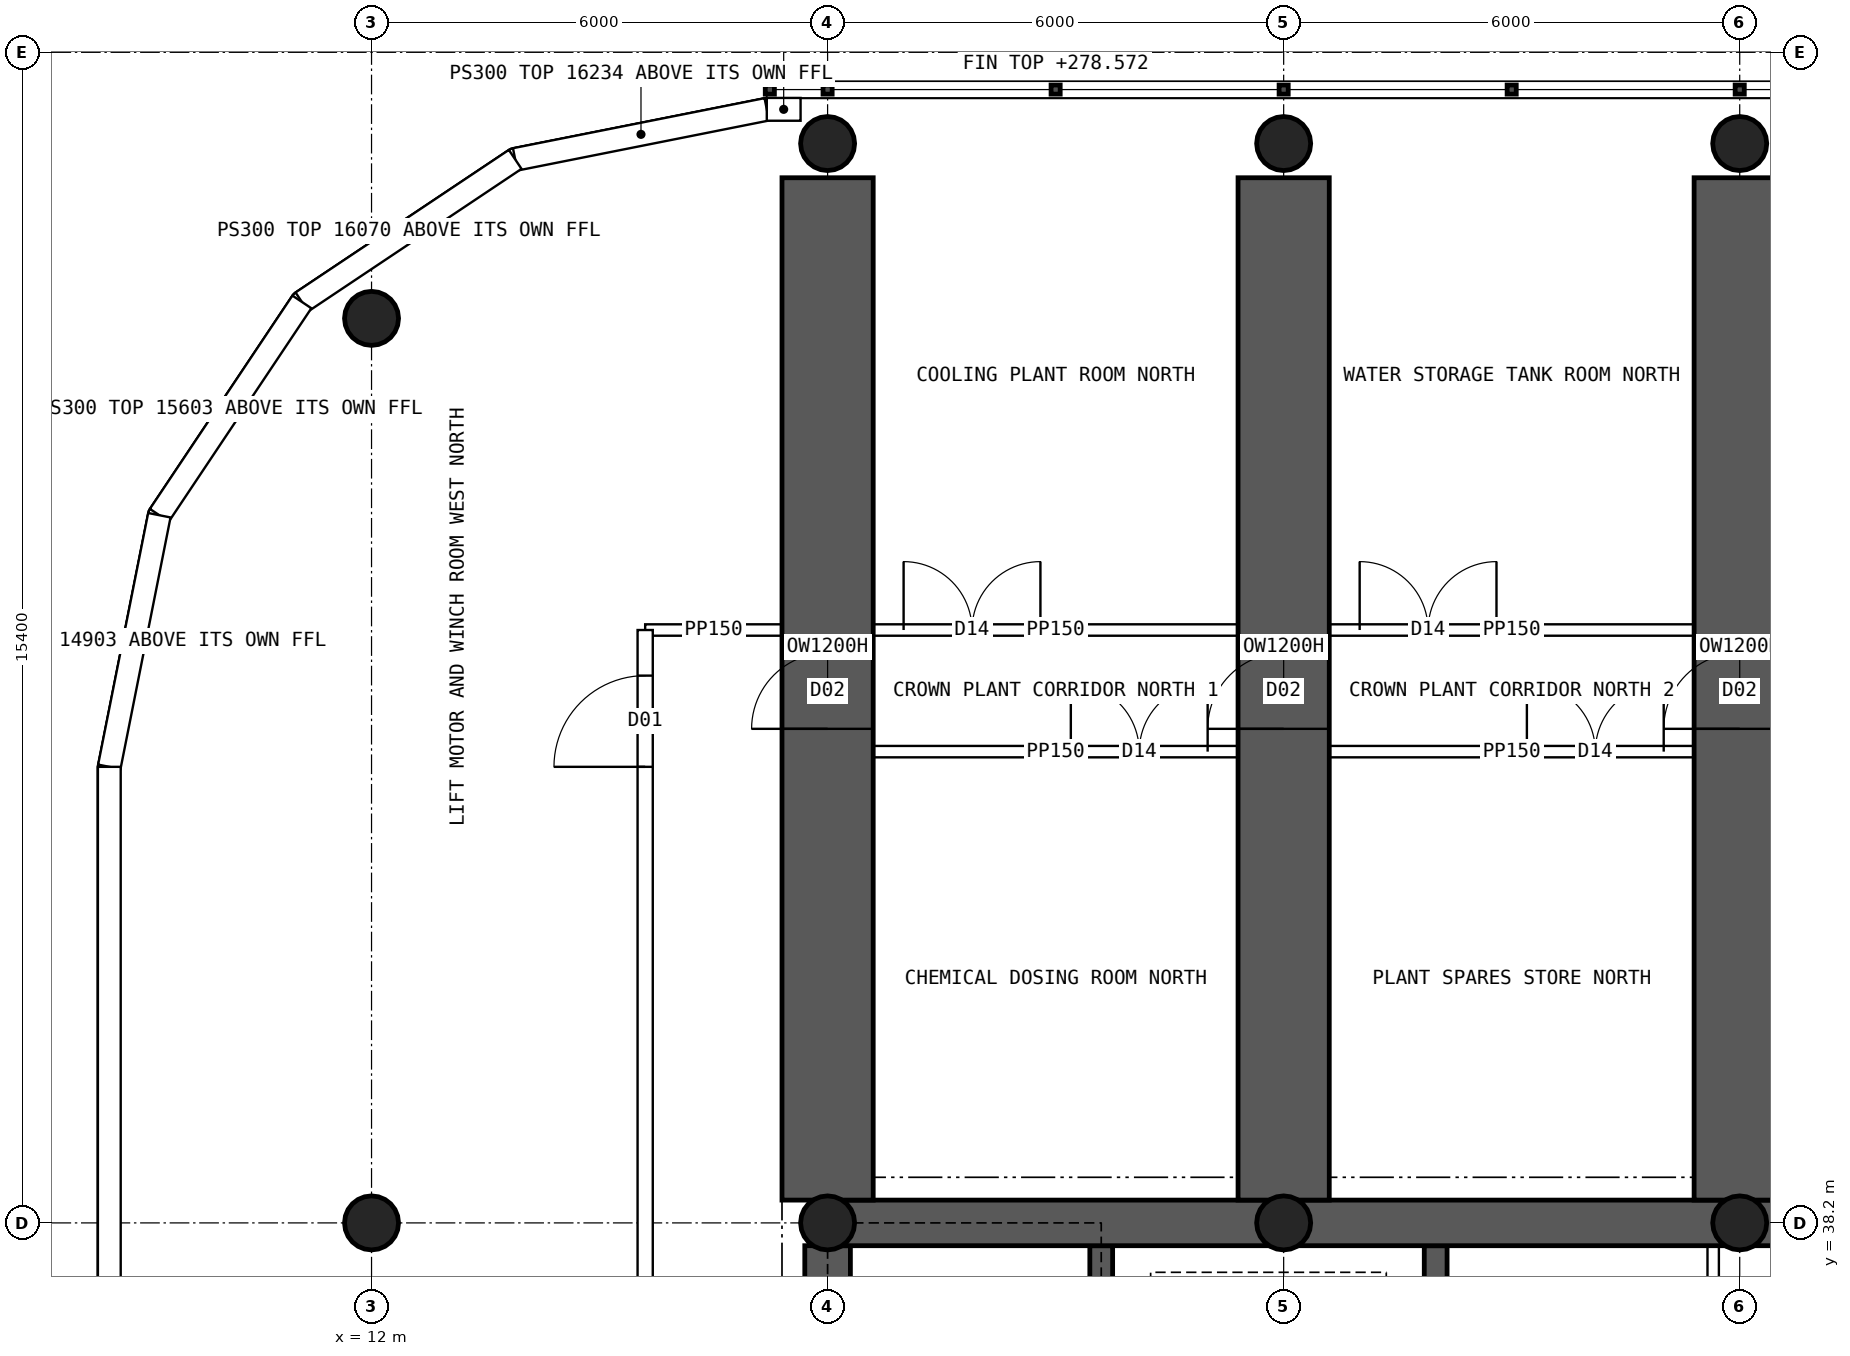
"""IFC4 building model, lengths in metres.
Left out: names, types, materials, properties, quantities, classifications, styles, units other than length and angle.
Written with IfcOpenShell. Run it as: python <this file> out.ifc"""

import sys

from ifc_helpers import new_model, si_unit, direction, frame, frame_2d, origin, origin_2d, place, context, subcontext, project, spatial, polyline, rectangle, hollow_circle, outline, extrude, clip, halfspace, element, fill, save


model = new_model("IFC4")
c1 = context("Model", 3, precision=1e-05, world=origin(), true_north=direction((0.0, 1.0)))
c2 = subcontext(c1, "Body", "Model", "MODEL_VIEW")
j1 = project(units=[si_unit("LENGTHUNIT", "METRE"), si_unit("PLANEANGLEUNIT", "RADIAN")], contexts=[c1])
p1 = place(None, origin())
s1 = spatial("IfcSite", under=j1, at=p1, CompositionType="ELEMENT")
p2 = place(p1, origin())
s2 = spatial("IfcBuilding", under=s1, at=p2, CompositionType="ELEMENT")
p3 = place(p2, frame((0.0, 0.0, 262.3)))
s3 = spatial("IfcBuildingStorey", under=s2, at=p3, CompositionType="ELEMENT", Elevation=262.3)
p4 = place(p3, frame((18.0, 38.2, 0.0), z_axis=(0.0, 0.0, 1.0), x_axis=(1.0, 0.0, 0.0)))
e1 = element("IfcWall", 1, at=p4, inside=s3, PredefinedType="SHEAR", context=c2, shape_type="SweptSolid", body=[
    extrude(rectangle(XDim=48.0, YDim=0.6, at=frame_2d((24.0, 0.0))), origin(), (0.0, 0.0, 1.0), 6.0),
])
p5 = place(p3, frame((18.0, 26.1, 0.0), z_axis=(0.0, 0.0, 1.0), x_axis=(0.0, 1.0, 0.0)))
e2 = element("IfcWall", 2, at=p5, inside=s3, PredefinedType="SHEAR", context=c2, shape_type="SweptSolid", body=[
    extrude(rectangle(XDim=11.8, YDim=0.6, at=frame_2d((5.9, 0.0))), origin(), (0.0, 0.0, 1.0), 6.0),
])
p6 = place(p5, frame((5.2, 0.0, 0.0)))
e3 = element("IfcOpeningElement", 3, at=p6, cuts=e2, PredefinedType="OPENING", context=c2, shape_type="SweptSolid", body=[
    extrude(rectangle(XDim=1.2, YDim=2.1, at=frame_2d((0.6, 1.05))), frame((0.0, 0.31, 0.0), z_axis=(0.0, -1.0, 0.0), x_axis=(1.0, 0.0, 0.0)), (0.0, 0.0, 1.0), 0.62),
])
for number, where, z_axis, x_axis in (
    (4, (21.6, 34.75, 0.0), (0.0, 0.0, 1.0), (0.0, 1.0, 0.0)),
    (5, (26.0, 34.75, 0.0), (0.0, 0.0, 1.0), (0.0, 1.0, 0.0)),
):
    element("IfcWall", number, at=place(p3, frame(where, z_axis=z_axis, x_axis=x_axis)), inside=s3, PredefinedType="SHEAR", context=c2, shape_type="SweptSolid", body=[
        extrude(rectangle(XDim=3.15, YDim=0.3, at=frame_2d((1.575, 0.0))), origin(), (0.0, 0.0, 1.0), 6.0),
    ])
p7 = place(p3, frame((18.0, 38.5, 0.0), z_axis=(0.0, 0.0, 1.0), x_axis=(0.0, 1.0, 0.0)))
e6 = element("IfcWall", 6, at=p7, inside=s3, PredefinedType="SHEAR", context=c2, shape_type="SweptSolid", body=[
    extrude(rectangle(XDim=13.45, YDim=1.2, at=frame_2d((6.725, 0.0))), origin(), (0.0, 0.0, 1.0), 4.4),
])
p8 = place(p7, frame((6.2, 0.0, 0.0)))
e7 = element("IfcOpeningElement", 7, at=p8, cuts=e6, PredefinedType="OPENING", context=c2, shape_type="SweptSolid", body=[
    extrude(rectangle(XDim=1.0, YDim=2.1, at=frame_2d((0.5, 1.05))), frame((0.0, 0.61, 0.0), z_axis=(0.0, -1.0, 0.0), x_axis=(1.0, 0.0, 0.0)), (0.0, 0.0, 1.0), 1.22),
])
p9 = place(p3, frame((24.0, 38.5, 0.0), z_axis=(0.0, 0.0, 1.0), x_axis=(0.0, 1.0, 0.0)))
e8 = element("IfcWall", 8, at=p9, inside=s3, PredefinedType="SHEAR", context=c2, shape_type="SweptSolid", body=[
    extrude(rectangle(XDim=13.45, YDim=1.2, at=frame_2d((6.725, 0.0))), origin(), (0.0, 0.0, 1.0), 4.4),
])
p10 = place(p9, frame((6.2, 0.0, 0.0)))
e9 = element("IfcOpeningElement", 9, at=p10, cuts=e8, PredefinedType="OPENING", context=c2, shape_type="SweptSolid", body=[
    extrude(rectangle(XDim=1.0, YDim=2.1, at=frame_2d((0.5, 1.05))), frame((0.0, 0.61, 0.0), z_axis=(0.0, -1.0, 0.0), x_axis=(1.0, 0.0, 0.0)), (0.0, 0.0, 1.0), 1.22),
])
p11 = place(p3, frame((30.0, 38.5, 0.0), z_axis=(0.0, 0.0, 1.0), x_axis=(0.0, 1.0, 0.0)))
e10 = element("IfcWall", 10, at=p11, inside=s3, PredefinedType="SHEAR", context=c2, shape_type="SweptSolid", body=[
    extrude(rectangle(XDim=13.45, YDim=1.2, at=frame_2d((6.725, 0.0))), origin(), (0.0, 0.0, 1.0), 4.4),
])
p12 = place(p11, frame((6.2, 0.0, 0.0)))
e11 = element("IfcOpeningElement", 11, at=p12, cuts=e10, PredefinedType="OPENING", context=c2, shape_type="SweptSolid", body=[
    extrude(rectangle(XDim=1.0, YDim=2.1, at=frame_2d((0.5, 1.05))), frame((0.0, 0.61, 0.0), z_axis=(0.0, -1.0, 0.0), x_axis=(1.0, 0.0, 0.0)), (0.0, 0.0, 1.0), 1.22),
])
p13 = place(p3, frame((12.0, 38.2, 0.0), z_axis=(0.0, 0.0, 1.0), x_axis=(1.0, 0.0, 0.0)))
e12 = element("IfcColumn", 12, at=p13, inside=s3, PredefinedType="COLUMN", context=c2, shape_type="SweptSolid", body=[
    extrude(hollow_circle(Radius=0.355, WallThickness=0.025, at=origin_2d()), origin(), (0.0, 0.0, 1.0), 11.524),
])
p14 = place(p3, frame((12.0, 50.1, 0.0), z_axis=(0.0, 0.0, 1.0), x_axis=(1.0, 0.0, 0.0)))
e13 = element("IfcColumn", 13, at=p14, inside=s3, PredefinedType="COLUMN", context=c2, shape_type="SweptSolid", body=[
    extrude(hollow_circle(Radius=0.355, WallThickness=0.025, at=origin_2d()), origin(), (0.0, 0.0, 1.0), 14.491),
])
p15 = place(p3, frame((18.0, 38.2, 0.0), z_axis=(0.0, 0.0, 1.0), x_axis=(1.0, 0.0, 0.0)))
e14 = element("IfcColumn", 14, at=p15, inside=s3, PredefinedType="COLUMN", context=c2, shape_type="SweptSolid", body=[
    extrude(hollow_circle(Radius=0.355, WallThickness=0.025, at=origin_2d()), origin(), (0.0, 0.0, 1.0), 11.517),
])
p16 = place(p3, frame((18.0, 52.4, 0.0), z_axis=(0.0, 0.0, 1.0), x_axis=(1.0, 0.0, 0.0)))
e15 = element("IfcColumn", 15, at=p16, inside=s3, PredefinedType="COLUMN", context=c2, shape_type="SweptSolid", body=[
    extrude(hollow_circle(Radius=0.355, WallThickness=0.025, at=origin_2d()), origin(), (0.0, 0.0, 1.0), 15.058),
])
p17 = place(p3, frame((24.0, 38.2, 0.0), z_axis=(0.0, 0.0, 1.0), x_axis=(1.0, 0.0, 0.0)))
e16 = element("IfcColumn", 16, at=p17, inside=s3, PredefinedType="COLUMN", context=c2, shape_type="SweptSolid", body=[
    extrude(hollow_circle(Radius=0.355, WallThickness=0.025, at=origin_2d()), origin(), (0.0, 0.0, 1.0), 11.517),
])
p18 = place(p3, frame((24.0, 52.4, 0.0), z_axis=(0.0, 0.0, 1.0), x_axis=(1.0, 0.0, 0.0)))
e17 = element("IfcColumn", 17, at=p18, inside=s3, PredefinedType="COLUMN", context=c2, shape_type="SweptSolid", body=[
    extrude(hollow_circle(Radius=0.355, WallThickness=0.025, at=origin_2d()), origin(), (0.0, 0.0, 1.0), 15.058),
])
p19 = place(p3, frame((30.0, 38.2, 0.0), z_axis=(0.0, 0.0, 1.0), x_axis=(1.0, 0.0, 0.0)))
e18 = element("IfcColumn", 18, at=p19, inside=s3, PredefinedType="COLUMN", context=c2, shape_type="SweptSolid", body=[
    extrude(hollow_circle(Radius=0.355, WallThickness=0.025, at=origin_2d()), origin(), (0.0, 0.0, 1.0), 11.517),
])
p20 = place(p3, frame((30.0, 52.4, 0.0), z_axis=(0.0, 0.0, 1.0), x_axis=(1.0, 0.0, 0.0)))
e19 = element("IfcColumn", 19, at=p20, inside=s3, PredefinedType="COLUMN", context=c2, shape_type="SweptSolid", body=[
    extrude(hollow_circle(Radius=0.355, WallThickness=0.025, at=origin_2d()), origin(), (0.0, 0.0, 1.0), 15.058),
])
p21 = place(p3, frame((8.55, 44.2, 0.0), z_axis=(0.0, 0.0, 1.0), x_axis=(0.0, -1.0, 0.0)))
e20 = element("IfcWall", 20, at=p21, inside=s3, PredefinedType="SOLIDWALL", context=c2, shape_type="Clipping", body=[
    clip(clip(extrude(outline(polyline([(-0.025, 0.0), (24.425, 0.0), (24.425, 7.988), (-0.025, 14.084), (-0.025, 0.0)])), frame((0.0, 0.15, 0.0), z_axis=(0.0, -1.0, 0.0), x_axis=(1.0, 0.0, 0.0)), (0.0, 0.0, 1.0), 0.3), halfspace(frame((0.0, 0.0, 0.0), z_axis=(-0.995184726707, 0.098017139978, 0.0)), False)), halfspace(frame((24.4, 0.0, 0.0), z_axis=(0.995184726707, 0.098017139978, 0.0)), False)),
])
p22 = place(p3, frame((17.2, 52.85, 0.0), z_axis=(0.0, 0.0, 1.0), x_axis=(-0.98078325777, -0.195100490205, 0.0)))
e21 = element("IfcWall", 21, at=p22, inside=s3, PredefinedType="SOLIDWALL", context=c2, shape_type="Clipping", body=[
    clip(clip(extrude(outline(polyline([(-0.04, 0.0), (3.415, 0.0), (3.415, 16.068), (-0.04, 16.236), (-0.04, 0.0)])), frame((0.0, 0.15, 0.0), z_axis=(0.0, -1.0, 0.0), x_axis=(1.0, 0.0, 0.0)), (0.0, 0.0, 1.0), 0.3), halfspace(frame((0.0, 0.0, 0.0), z_axis=(-0.980785349348, 0.195089975409, 0.0)), False)), halfspace(frame((3.375, 0.0, 0.0), z_axis=(0.980785349348, 0.195089975409, 0.0)), False)),
])
p23 = place(p3, frame((13.89, 52.192, 0.0), z_axis=(0.0, 0.0, 1.0), x_axis=(-0.831460037396, -0.555584562613, 0.0)))
e22 = element("IfcWall", 22, at=p23, inside=s3, PredefinedType="SOLIDWALL", context=c2, shape_type="Clipping", body=[
    clip(clip(extrude(outline(polyline([(-0.04, 0.0), (3.415, 0.0), (3.415, 15.597), (3.375, 15.603), (-0.04, 16.076), (-0.04, 0.0)])), frame((0.0, 0.15, 0.0), z_axis=(0.0, -1.0, 0.0), x_axis=(1.0, 0.0, 0.0)), (0.0, 0.0, 1.0), 0.3), halfspace(frame((0.0, 0.0, 0.0), z_axis=(-0.980785349348, 0.195089975409, 0.0)), False)), halfspace(frame((3.375, 0.0, 0.0), z_axis=(0.980785349348, 0.195089975409, 0.0)), False)),
])
p24 = place(p3, frame((11.083, 50.316, 0.0), z_axis=(0.0, 0.0, 1.0), x_axis=(-0.555567969291, -0.831471124873, 0.0)))
e23 = element("IfcWall", 23, at=p24, inside=s3, PredefinedType="SOLIDWALL", context=c2, shape_type="Clipping", body=[
    clip(clip(extrude(outline(polyline([(-0.04, 0.0), (3.415, 0.0), (3.415, 14.895), (-0.04, 15.611), (-0.04, 0.0)])), frame((0.0, 0.15, 0.0), z_axis=(0.0, -1.0, 0.0), x_axis=(1.0, 0.0, 0.0)), (0.0, 0.0, 1.0), 0.3), halfspace(frame((0.0, 0.0, 0.0), z_axis=(-0.980785349348, 0.195089975409, 0.0)), False)), halfspace(frame((3.375, 0.0, 0.0), z_axis=(0.980785349348, 0.195089975409, 0.0)), False)),
])
p25 = place(p3, frame((9.208, 47.51, 0.0), z_axis=(0.0, 0.0, 1.0), x_axis=(-0.19508664885, -0.980786011034, 0.0)))
e24 = element("IfcWall", 24, at=p25, inside=s3, PredefinedType="SOLIDWALL", context=c2, shape_type="Clipping", body=[
    clip(clip(extrude(outline(polyline([(-0.04, 0.0), (3.415, 0.0), (3.415, 14.068), (3.375, 14.078), (-0.04, 14.913), (-0.04, 0.0)])), frame((0.0, 0.15, 0.0), z_axis=(0.0, -1.0, 0.0), x_axis=(1.0, 0.0, 0.0)), (0.0, 0.0, 1.0), 0.3), halfspace(frame((0.0, 0.0, 0.0), z_axis=(-0.980785349348, 0.195089975409, 0.0)), False)), halfspace(frame((3.375, 0.0, 0.0), z_axis=(0.995184765828, 0.098016742771, 0.0)), False)),
])
p26 = place(p3, frame((17.2, 52.85, 0.0), z_axis=(0.0, 0.0, 1.0), x_axis=(1.0, 0.0, 0.0)))
e25 = element("IfcWall", 25, at=p26, inside=s3, PredefinedType="SOLIDWALL", context=c2, shape_type="SweptSolid", body=[
    extrude(outline(polyline([(0.0, 0.0), (0.445, 0.0), (0.445, 16.234), (0.0, 16.234), (0.0, 0.0)])), frame((0.0, 0.15, 0.0), z_axis=(0.0, -1.0, 0.0), x_axis=(1.0, 0.0, 0.0)), (0.0, 0.0, 1.0), 0.3),
])
p27 = place(p3, frame((29.651, 34.75, 0.0), z_axis=(0.0, 0.0, 1.0), x_axis=(0.0, 1.0, 0.0)))
e26 = element("IfcWall", 26, at=p27, inside=s3, PredefinedType="SOLIDWALL", context=c2, shape_type="SweptSolid", body=[
    extrude(rectangle(XDim=3.15, YDim=0.15, at=frame_2d((1.575, 0.0))), origin(), (0.0, 0.0, 1.0), 6.0),
])
p28 = place(p3, frame((15.6, 18.0, 0.0), z_axis=(0.0, 0.0, 1.0), x_axis=(0.0, 1.0, 0.0)))
e27 = element("IfcWall", 27, at=p28, inside=s3, PredefinedType="SOLIDWALL", context=c2, shape_type="SweptSolid", body=[
    extrude(rectangle(XDim=28.0, YDim=0.2, at=frame_2d((14.0, 0.0))), origin(), (0.0, 0.0, 1.0), 6.0),
])
p29 = place(p28, frame((13.1, 0.0, 0.0)))
e28 = element("IfcOpeningElement", 28, at=p29, cuts=e27, PredefinedType="OPENING", context=c2, shape_type="SweptSolid", body=[
    extrude(rectangle(XDim=1.8, YDim=2.1, at=frame_2d((0.9, 1.05))), frame((0.0, 0.11, 0.0), z_axis=(0.0, -1.0, 0.0), x_axis=(1.0, 0.0, 0.0)), (0.0, 0.0, 1.0), 0.22),
])
p30 = place(p28, frame((0.6, 0.0, 0.0)))
e29 = element("IfcOpeningElement", 29, at=p30, cuts=e27, PredefinedType="OPENING", context=c2, shape_type="SweptSolid", body=[
    extrude(rectangle(XDim=1.2, YDim=2.1, at=frame_2d((0.6, 1.05))), frame((0.0, 0.11, 0.0), z_axis=(0.0, -1.0, 0.0), x_axis=(1.0, 0.0, 0.0)), (0.0, 0.0, 1.0), 0.22),
])
p31 = place(p28, frame((26.2, 0.0, 0.0)))
e30 = element("IfcOpeningElement", 30, at=p31, cuts=e27, PredefinedType="OPENING", context=c2, shape_type="SweptSolid", body=[
    extrude(rectangle(XDim=1.2, YDim=2.1, at=frame_2d((0.6, 1.05))), frame((0.0, 0.11, 0.0), z_axis=(0.0, -1.0, 0.0), x_axis=(1.0, 0.0, 0.0)), (0.0, 0.0, 1.0), 0.22),
])
p32 = place(p3, frame((15.6, 46.0, 0.0), z_axis=(0.0, 0.0, 1.0), x_axis=(1.0, 0.0, 0.0)))
e31 = element("IfcWall", 31, at=p32, inside=s3, PredefinedType="PARTITIONING", context=c2, shape_type="SweptSolid", body=[
    extrude(rectangle(XDim=1.8, YDim=0.15, at=frame_2d((0.9, 0.0))), origin(), (0.0, 0.0, 1.0), 6.0),
])
p33 = place(p3, frame((18.6, 46.0, 0.0), z_axis=(0.0, 0.0, 1.0), x_axis=(1.0, 0.0, 0.0)))
e32 = element("IfcWall", 32, at=p33, inside=s3, PredefinedType="PARTITIONING", context=c2, shape_type="SweptSolid", body=[
    extrude(rectangle(XDim=4.8, YDim=0.15, at=frame_2d((2.4, 0.0))), origin(), (0.0, 0.0, 1.0), 6.0),
])
p34 = place(p33, frame((0.4, 0.0, 0.0)))
e33 = element("IfcOpeningElement", 33, at=p34, cuts=e32, PredefinedType="OPENING", context=c2, shape_type="SweptSolid", body=[
    extrude(rectangle(XDim=1.8, YDim=2.4, at=frame_2d((0.9, 1.2))), frame((0.0, 0.085, 0.0), z_axis=(0.0, -1.0, 0.0), x_axis=(1.0, 0.0, 0.0)), (0.0, 0.0, 1.0), 0.17),
])
p35 = place(p3, frame((18.6, 44.4, 0.0), z_axis=(0.0, 0.0, 1.0), x_axis=(1.0, 0.0, 0.0)))
e34 = element("IfcWall", 34, at=p35, inside=s3, PredefinedType="PARTITIONING", context=c2, shape_type="SweptSolid", body=[
    extrude(rectangle(XDim=4.8, YDim=0.15, at=frame_2d((2.4, 0.0))), origin(), (0.0, 0.0, 1.0), 6.0),
])
p36 = place(p35, frame((2.6, 0.0, 0.0)))
e35 = element("IfcOpeningElement", 35, at=p36, cuts=e34, PredefinedType="OPENING", context=c2, shape_type="SweptSolid", body=[
    extrude(rectangle(XDim=1.8, YDim=2.4, at=frame_2d((0.9, 1.2))), frame((0.0, 0.085, 0.0), z_axis=(0.0, -1.0, 0.0), x_axis=(1.0, 0.0, 0.0)), (0.0, 0.0, 1.0), 0.17),
])
p37 = place(p3, frame((24.6, 46.0, 0.0), z_axis=(0.0, 0.0, 1.0), x_axis=(1.0, 0.0, 0.0)))
e36 = element("IfcWall", 36, at=p37, inside=s3, PredefinedType="PARTITIONING", context=c2, shape_type="SweptSolid", body=[
    extrude(rectangle(XDim=4.8, YDim=0.15, at=frame_2d((2.4, 0.0))), origin(), (0.0, 0.0, 1.0), 6.0),
])
p38 = place(p37, frame((0.4, 0.0, 0.0)))
e37 = element("IfcOpeningElement", 37, at=p38, cuts=e36, PredefinedType="OPENING", context=c2, shape_type="SweptSolid", body=[
    extrude(rectangle(XDim=1.8, YDim=2.4, at=frame_2d((0.9, 1.2))), frame((0.0, 0.085, 0.0), z_axis=(0.0, -1.0, 0.0), x_axis=(1.0, 0.0, 0.0)), (0.0, 0.0, 1.0), 0.17),
])
p39 = place(p3, frame((24.6, 44.4, 0.0), z_axis=(0.0, 0.0, 1.0), x_axis=(1.0, 0.0, 0.0)))
e38 = element("IfcWall", 38, at=p39, inside=s3, PredefinedType="PARTITIONING", context=c2, shape_type="SweptSolid", body=[
    extrude(rectangle(XDim=4.8, YDim=0.15, at=frame_2d((2.4, 0.0))), origin(), (0.0, 0.0, 1.0), 6.0),
])
p40 = place(p39, frame((2.6, 0.0, 0.0)))
e39 = element("IfcOpeningElement", 39, at=p40, cuts=e38, PredefinedType="OPENING", context=c2, shape_type="SweptSolid", body=[
    extrude(rectangle(XDim=1.8, YDim=2.4, at=frame_2d((0.9, 1.2))), frame((0.0, 0.085, 0.0), z_axis=(0.0, -1.0, 0.0), x_axis=(1.0, 0.0, 0.0)), (0.0, 0.0, 1.0), 0.17),
])
p41 = place(p31, origin())
e40 = element("IfcDoor", 40, at=p41, inside=s3, OperationType="SINGLE_SWING_LEFT", PredefinedType="DOOR", context=c2, shape_type="SweptSolid", body=[
    extrude(rectangle(XDim=1.2, YDim=2.1, at=frame_2d((0.6, 1.05))), frame((0.0, 0.025, 0.0), z_axis=(0.0, -1.0, 0.0), x_axis=(1.0, 0.0, 0.0)), (0.0, 0.0, 1.0), 0.05),
])
fill(e30, e40)
p42 = place(p8, origin())
e41 = element("IfcDoor", 41, at=p42, inside=s3, OperationType="SINGLE_SWING_LEFT", PredefinedType="DOOR", context=c2, shape_type="SweptSolid", body=[
    extrude(rectangle(XDim=1.0, YDim=2.1, at=frame_2d((0.5, 1.05))), frame((0.0, 0.025, 0.0), z_axis=(0.0, -1.0, 0.0), x_axis=(1.0, 0.0, 0.0)), (0.0, 0.0, 1.0), 0.05),
])
fill(e7, e41)
p43 = place(p10, origin())
e42 = element("IfcDoor", 42, at=p43, inside=s3, OperationType="SINGLE_SWING_LEFT", PredefinedType="DOOR", context=c2, shape_type="SweptSolid", body=[
    extrude(rectangle(XDim=1.0, YDim=2.1, at=frame_2d((0.5, 1.05))), frame((0.0, 0.025, 0.0), z_axis=(0.0, -1.0, 0.0), x_axis=(1.0, 0.0, 0.0)), (0.0, 0.0, 1.0), 0.05),
])
fill(e9, e42)
p44 = place(p12, origin())
e43 = element("IfcDoor", 43, at=p44, inside=s3, OperationType="SINGLE_SWING_LEFT", PredefinedType="DOOR", context=c2, shape_type="SweptSolid", body=[
    extrude(rectangle(XDim=1.0, YDim=2.1, at=frame_2d((0.5, 1.05))), frame((0.0, 0.025, 0.0), z_axis=(0.0, -1.0, 0.0), x_axis=(1.0, 0.0, 0.0)), (0.0, 0.0, 1.0), 0.05),
])
fill(e11, e43)
p45 = place(p34, origin())
e44 = element("IfcDoor", 44, at=p45, inside=s3, OperationType="DOUBLE_DOOR_SINGLE_SWING", PredefinedType="DOOR", context=c2, shape_type="SweptSolid", body=[
    extrude(rectangle(XDim=1.8, YDim=2.4, at=frame_2d((0.9, 1.2))), frame((0.0, 0.025, 0.0), z_axis=(0.0, -1.0, 0.0), x_axis=(1.0, 0.0, 0.0)), (0.0, 0.0, 1.0), 0.05),
])
fill(e33, e44)
p46 = place(p36, origin())
e45 = element("IfcDoor", 45, at=p46, inside=s3, OperationType="DOUBLE_DOOR_SINGLE_SWING", PredefinedType="DOOR", context=c2, shape_type="SweptSolid", body=[
    extrude(rectangle(XDim=1.8, YDim=2.4, at=frame_2d((0.9, 1.2))), frame((0.0, 0.025, 0.0), z_axis=(0.0, -1.0, 0.0), x_axis=(1.0, 0.0, 0.0)), (0.0, 0.0, 1.0), 0.05),
])
fill(e35, e45)
p47 = place(p38, origin())
e46 = element("IfcDoor", 46, at=p47, inside=s3, OperationType="DOUBLE_DOOR_SINGLE_SWING", PredefinedType="DOOR", context=c2, shape_type="SweptSolid", body=[
    extrude(rectangle(XDim=1.8, YDim=2.4, at=frame_2d((0.9, 1.2))), frame((0.0, 0.025, 0.0), z_axis=(0.0, -1.0, 0.0), x_axis=(1.0, 0.0, 0.0)), (0.0, 0.0, 1.0), 0.05),
])
fill(e37, e46)
p48 = place(p40, origin())
e47 = element("IfcDoor", 47, at=p48, inside=s3, OperationType="DOUBLE_DOOR_SINGLE_SWING", PredefinedType="DOOR", context=c2, shape_type="SweptSolid", body=[
    extrude(rectangle(XDim=1.8, YDim=2.4, at=frame_2d((0.9, 1.2))), frame((0.0, 0.025, 0.0), z_axis=(0.0, -1.0, 0.0), x_axis=(1.0, 0.0, 0.0)), (0.0, 0.0, 1.0), 0.05),
])
fill(e39, e47)
save(model, sys.argv[1])
